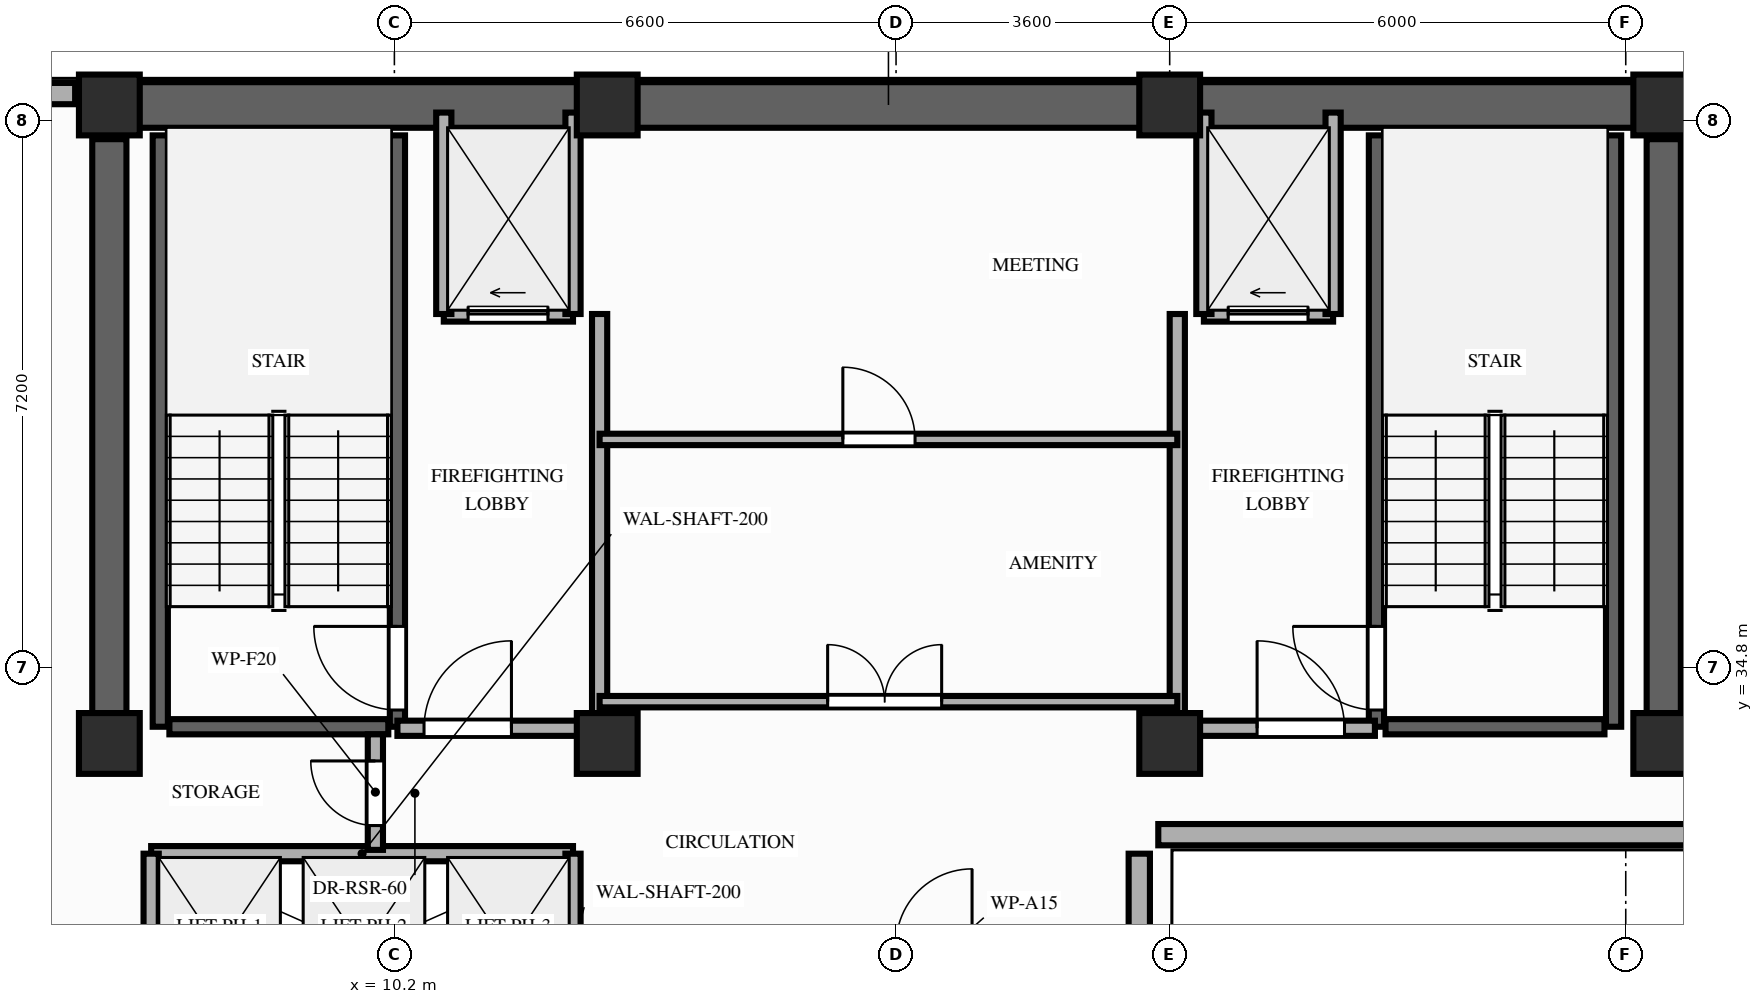
"""IFC4 building model, lengths in metres.
Left out: names, types, materials, properties, quantities, classifications, styles, units other than length and angle.
Written with IfcOpenShell. Run it as: python <this file> out.ifc"""

import sys

from ifc_helpers import new_model, si_unit, direction, frame, frame_2d, origin, origin_2d, place, context, subcontext, project, spatial, rectangle, extrude, element, fill, save


model = new_model("IFC4")
c1 = context("Model", 3, precision=1e-05, world=origin(), true_north=direction((0.0, 1.0)))
c2 = subcontext(c1, "Body", "Model", "MODEL_VIEW")
j1 = project(units=[si_unit("LENGTHUNIT", "METRE"), si_unit("PLANEANGLEUNIT", "RADIAN")], contexts=[c1])
p1 = place(None, origin())
s1 = spatial("IfcSite", under=j1, at=p1, CompositionType="ELEMENT")
p2 = place(p1, origin())
s2 = spatial("IfcBuilding", under=s1, at=p2, CompositionType="ELEMENT")
p3 = place(p2, frame((0.0, 0.0, 244.0)))
s3 = spatial("IfcBuildingStorey", under=s2, at=p3, CompositionType="ELEMENT", Elevation=244.0)
for number, where, z_axis, x_axis in (
    (1, (6.45, 33.8, 0.0), (0.0, 0.0, 1.0), (1.0, 0.0, 0.0)),
    (2, (13.0, 33.8, 0.0), (0.0, 0.0, 1.0), (1.0, 0.0, 0.0)),
    (3, (20.4, 33.8, 0.0), (0.0, 0.0, 1.0), (1.0, 0.0, 0.0)),
    (4, (26.9, 33.8, 0.0), (0.0, 0.0, 1.0), (1.0, 0.0, 0.0)),
    (5, (6.45, 42.2, 0.0), (0.0, 0.0, 1.0), (1.0, 0.0, 0.0)),
    (6, (13.0, 42.2, 0.0), (0.0, 0.0, 1.0), (1.0, 0.0, 0.0)),
    (7, (20.4, 42.2, 0.0), (0.0, 0.0, 1.0), (1.0, 0.0, 0.0)),
    (8, (26.9, 42.2, 0.0), (0.0, 0.0, 1.0), (1.0, 0.0, 0.0)),
):
    element("IfcColumn", number, at=place(p3, frame(where, z_axis=z_axis, x_axis=x_axis)), inside=s3, PredefinedType="COLUMN", context=c2, shape_type="SweptSolid", body=[
        extrude(rectangle(XDim=0.8, YDim=0.8, at=origin_2d()), origin(), (0.0, 0.0, 1.0), 3.2),
    ])
p4 = place(p3, frame((20.0, 10.8, 0.0), z_axis=(0.0, 0.0, 1.0), x_axis=(0.0, 1.0, 0.0)))
e9 = element("IfcWall", 9, at=p4, inside=s3, PredefinedType="STANDARD", context=c2, shape_type="SweptSolid", body=[
    extrude(rectangle(XDim=21.55, YDim=0.28, at=frame_2d((10.775, 0.0))), origin(), (0.0, 0.0, 1.0), 2.56),
])
p5 = place(p4, frame((8.6, 0.0, 0.85)))
e10 = element("IfcOpeningElement", 10, at=p5, cuts=e9, PredefinedType="OPENING", context=c2, shape_type="SweptSolid", body=[
    extrude(rectangle(XDim=2.6, YDim=1.46, at=frame_2d((1.3, 0.73))), frame((0.0, 0.15, 0.0), z_axis=(0.0, -1.0, 0.0), x_axis=(1.0, 0.0, 0.0)), (0.0, 0.0, 1.0), 0.3),
])
p6 = place(p3, frame((6.0, 42.35, 0.0), z_axis=(0.0, 0.0, 1.0), x_axis=(-1.0, 0.0, 0.0)))
e11 = element("IfcWall", 11, at=p6, inside=s3, PredefinedType="STANDARD", context=c2, shape_type="SweptSolid", body=[
    extrude(rectangle(XDim=1.0, YDim=0.28, at=frame_2d((0.5, 0.0))), origin(), (0.0, 0.0, 1.0), 3.02),
])
p7 = place(p3, frame((20.25, 32.6, 0.0), z_axis=(0.0, 0.0, 1.0), x_axis=(1.0, 0.0, 0.0)))
e12 = element("IfcWall", 12, at=p7, inside=s3, PredefinedType="STANDARD", context=c2, shape_type="SweptSolid", body=[
    extrude(rectangle(XDim=7.35, YDim=0.28, at=frame_2d((3.675, 0.0))), origin(), (0.0, 0.0, 1.0), 2.56),
])
p8 = place(p3, frame((6.45, 42.2, 0.0), z_axis=(0.0, 0.0, 1.0), x_axis=(1.0, 0.0, 0.0)))
e13 = element("IfcWall", 13, at=p8, inside=s3, PredefinedType="SHEAR", context=c2, shape_type="SweptSolid", body=[
    extrude(rectangle(XDim=20.45, YDim=0.6, at=frame_2d((10.225, 0.0))), origin(), (0.0, 0.0, 1.0), 3.02),
])
for number, where, z_axis, x_axis in (
    (14, (6.45, 33.8, 0.0), (0.0, 0.0, 1.0), (0.0, 1.0, 0.0)),
    (15, (26.9, 33.8, 0.0), (0.0, 0.0, 1.0), (0.0, 1.0, 0.0)),
):
    element("IfcWall", number, at=place(p3, frame(where, z_axis=z_axis, x_axis=x_axis)), inside=s3, PredefinedType="SHEAR", context=c2, shape_type="SweptSolid", body=[
        extrude(rectangle(XDim=7.95, YDim=0.45, at=frame_2d((3.975, 0.0))), origin(), (0.0, 0.0, 1.0), 3.02),
    ])
p9 = place(p3, frame((7.12, 34.02, 0.0), z_axis=(0.0, 0.0, 1.0), x_axis=(0.0, 1.0, 0.0)))
e16 = element("IfcWall", 16, at=p9, inside=s3, PredefinedType="SHEAR", context=c2, shape_type="SweptSolid", body=[
    extrude(rectangle(XDim=7.78, YDim=0.2, at=frame_2d((3.89, 0.0))), origin(), (0.0, 0.0, 1.0), 3.02),
])
p10 = place(p3, frame((10.24, 34.02, 0.0), z_axis=(0.0, 0.0, 1.0), x_axis=(0.0, 1.0, 0.0)))
e17 = element("IfcWall", 17, at=p10, inside=s3, PredefinedType="SHEAR", context=c2, shape_type="SweptSolid", body=[
    extrude(rectangle(XDim=7.78, YDim=0.2, at=frame_2d((3.89, 0.0))), origin(), (0.0, 0.0, 1.0), 3.02),
])
p11 = place(p10, frame((0.22, 0.0, 0.0)))
e18 = element("IfcOpeningElement", 18, at=p11, cuts=e17, PredefinedType="OPENING", context=c2, shape_type="SweptSolid", body=[
    extrude(rectangle(XDim=1.1, YDim=2.15, at=frame_2d((0.55, 1.075))), frame((0.0, 0.11, 0.0), z_axis=(0.0, -1.0, 0.0), x_axis=(1.0, 0.0, 0.0)), (0.0, 0.0, 1.0), 0.22),
])
p12 = place(p3, frame((7.24, 34.02, 0.0), z_axis=(0.0, 0.0, 1.0), x_axis=(1.0, 0.0, 0.0)))
e19 = element("IfcWall", 19, at=p12, inside=s3, PredefinedType="SHEAR", context=c2, shape_type="SweptSolid", body=[
    extrude(rectangle(XDim=2.88, YDim=0.2, at=frame_2d((1.44, 0.0))), origin(), (0.0, 0.0, 1.0), 3.02),
])
p13 = place(p3, frame((23.12, 34.02, 0.0), z_axis=(0.0, 0.0, 1.0), x_axis=(0.0, 1.0, 0.0)))
e20 = element("IfcWall", 20, at=p13, inside=s3, PredefinedType="SHEAR", context=c2, shape_type="SweptSolid", body=[
    extrude(rectangle(XDim=7.78, YDim=0.2, at=frame_2d((3.89, 0.0))), origin(), (0.0, 0.0, 1.0), 3.02),
])
p14 = place(p13, frame((0.22, 0.0, 0.0)))
e21 = element("IfcOpeningElement", 21, at=p14, cuts=e20, PredefinedType="OPENING", context=c2, shape_type="SweptSolid", body=[
    extrude(rectangle(XDim=1.1, YDim=2.15, at=frame_2d((0.55, 1.075))), frame((0.0, 0.11, 0.0), z_axis=(0.0, -1.0, 0.0), x_axis=(1.0, 0.0, 0.0)), (0.0, 0.0, 1.0), 0.22),
])
p15 = place(p3, frame((26.24, 34.02, 0.0), z_axis=(0.0, 0.0, 1.0), x_axis=(0.0, 1.0, 0.0)))
e22 = element("IfcWall", 22, at=p15, inside=s3, PredefinedType="SHEAR", context=c2, shape_type="SweptSolid", body=[
    extrude(rectangle(XDim=7.78, YDim=0.2, at=frame_2d((3.89, 0.0))), origin(), (0.0, 0.0, 1.0), 3.02),
])
p16 = place(p3, frame((23.24, 34.02, 0.0), z_axis=(0.0, 0.0, 1.0), x_axis=(1.0, 0.0, 0.0)))
e23 = element("IfcWall", 23, at=p16, inside=s3, PredefinedType="SHEAR", context=c2, shape_type="SweptSolid", body=[
    extrude(rectangle(XDim=2.88, YDim=0.2, at=frame_2d((1.44, 0.0))), origin(), (0.0, 0.0, 1.0), 3.02),
])
p17 = place(p3, frame((7.0, 32.35, 0.0), z_axis=(0.0, 0.0, 1.0), x_axis=(1.0, 0.0, 0.0)))
e24 = element("IfcWall", 24, at=p17, inside=s3, PredefinedType="MOVABLE", context=c2, shape_type="SweptSolid", body=[
    extrude(rectangle(XDim=5.55, YDim=0.2, at=frame_2d((2.775, 0.0))), origin(), (0.0, 0.0, 1.0), 3.02),
])
for number, where, z_axis, x_axis in (
    (25, (7.0, 29.85, 0.0), (0.0, 0.0, 1.0), (0.0, 1.0, 0.0)),
    (26, (12.55, 29.85, 0.0), (0.0, 0.0, 1.0), (0.0, 1.0, 0.0)),
):
    element("IfcWall", number, at=place(p3, frame(where, z_axis=z_axis, x_axis=x_axis)), inside=s3, PredefinedType="MOVABLE", context=c2, shape_type="SweptSolid", body=[
        extrude(rectangle(XDim=2.5, YDim=0.2, at=frame_2d((1.25, 0.0))), origin(), (0.0, 0.0, 1.0), 3.02),
    ])
p18 = place(p3, frame((10.85, 39.45, 0.0), z_axis=(0.0, 0.0, 1.0), x_axis=(1.0, 0.0, 0.0)))
e27 = element("IfcWall", 27, at=p18, inside=s3, PredefinedType="MOVABLE", context=c2, shape_type="SweptSolid", body=[
    extrude(rectangle(XDim=1.7, YDim=0.2, at=frame_2d((0.85, 0.0))), origin(), (0.0, 0.0, 1.0), 3.02),
])
p19 = place(p18, frame((0.32, 0.0, 0.0)))
e28 = element("IfcOpeningElement", 28, at=p19, cuts=e27, PredefinedType="OPENING", context=c2, shape_type="SweptSolid", body=[
    extrude(rectangle(XDim=1.05, YDim=2.15, at=frame_2d((0.525, 1.075))), frame((0.0, 0.11, 0.0), z_axis=(0.0, -1.0, 0.0), x_axis=(1.0, 0.0, 0.0)), (0.0, 0.0, 1.0), 0.22),
])
p20 = place(p3, frame((20.85, 39.45, 0.0), z_axis=(0.0, 0.0, 1.0), x_axis=(1.0, 0.0, 0.0)))
e29 = element("IfcWall", 29, at=p20, inside=s3, PredefinedType="MOVABLE", context=c2, shape_type="SweptSolid", body=[
    extrude(rectangle(XDim=1.7, YDim=0.2, at=frame_2d((0.85, 0.0))), origin(), (0.0, 0.0, 1.0), 3.02),
])
p21 = place(p20, frame((0.32, 0.0, 0.0)))
e30 = element("IfcOpeningElement", 30, at=p21, cuts=e29, PredefinedType="OPENING", context=c2, shape_type="SweptSolid", body=[
    extrude(rectangle(XDim=1.05, YDim=2.15, at=frame_2d((0.525, 1.075))), frame((0.0, 0.11, 0.0), z_axis=(0.0, -1.0, 0.0), x_axis=(1.0, 0.0, 0.0)), (0.0, 0.0, 1.0), 0.22),
])
for number, where, z_axis, x_axis in (
    (31, (10.85, 39.45, 0.0), (0.0, 0.0, 1.0), (0.0, 1.0, 0.0)),
    (32, (12.55, 39.45, 0.0), (0.0, 0.0, 1.0), (0.0, 1.0, 0.0)),
):
    element("IfcWall", number, at=place(p3, frame(where, z_axis=z_axis, x_axis=x_axis)), inside=s3, PredefinedType="MOVABLE", context=c2, shape_type="SweptSolid", body=[
        extrude(rectangle(XDim=2.65, YDim=0.2, at=frame_2d((1.325, 0.0))), origin(), (0.0, 0.0, 1.0), 2.56),
    ])
p22 = place(p3, frame((12.9, 34.0, 0.0), z_axis=(0.0, 0.0, 1.0), x_axis=(0.0, 1.0, 0.0)))
e33 = element("IfcWall", 33, at=p22, inside=s3, PredefinedType="PARTITIONING", context=c2, shape_type="SweptSolid", body=[
    extrude(rectangle(XDim=5.45, YDim=0.2, at=frame_2d((2.725, 0.0))), origin(), (0.0, 0.0, 1.0), 2.56),
])
p23 = place(p3, frame((10.24, 34.0, 0.0), z_axis=(0.0, 0.0, 1.0), x_axis=(1.0, 0.0, 0.0)))
e34 = element("IfcWall", 34, at=p23, inside=s3, PredefinedType="PARTITIONING", context=c2, shape_type="SweptSolid", body=[
    extrude(rectangle(XDim=2.66, YDim=0.2, at=frame_2d((1.33, 0.0))), origin(), (0.0, 0.0, 1.0), 2.56),
])
p24 = place(p23, frame((0.35, 0.0, 0.0)))
e35 = element("IfcOpeningElement", 35, at=p24, cuts=e34, PredefinedType="OPENING", context=c2, shape_type="SweptSolid", body=[
    extrude(rectangle(XDim=1.15, YDim=2.15, at=frame_2d((0.575, 1.075))), frame((0.0, 0.11, 0.0), z_axis=(0.0, -1.0, 0.0), x_axis=(1.0, 0.0, 0.0)), (0.0, 0.0, 1.0), 0.22),
])
for number, where, z_axis, x_axis in (
    (36, (20.85, 39.45, 0.0), (0.0, 0.0, 1.0), (0.0, 1.0, 0.0)),
    (37, (22.55, 39.45, 0.0), (0.0, 0.0, 1.0), (0.0, 1.0, 0.0)),
):
    element("IfcWall", number, at=place(p3, frame(where, z_axis=z_axis, x_axis=x_axis)), inside=s3, PredefinedType="MOVABLE", context=c2, shape_type="SweptSolid", body=[
        extrude(rectangle(XDim=2.65, YDim=0.2, at=frame_2d((1.325, 0.0))), origin(), (0.0, 0.0, 1.0), 2.56),
    ])
p25 = place(p3, frame((20.5, 34.0, 0.0), z_axis=(0.0, 0.0, 1.0), x_axis=(0.0, 1.0, 0.0)))
e38 = element("IfcWall", 38, at=p25, inside=s3, PredefinedType="PARTITIONING", context=c2, shape_type="SweptSolid", body=[
    extrude(rectangle(XDim=5.45, YDim=0.2, at=frame_2d((2.725, 0.0))), origin(), (0.0, 0.0, 1.0), 2.56),
])
p26 = place(p3, frame((20.5, 34.0, 0.0), z_axis=(0.0, 0.0, 1.0), x_axis=(1.0, 0.0, 0.0)))
e39 = element("IfcWall", 39, at=p26, inside=s3, PredefinedType="PARTITIONING", context=c2, shape_type="SweptSolid", body=[
    extrude(rectangle(XDim=2.6, YDim=0.2, at=frame_2d((1.3, 0.0))), origin(), (0.0, 0.0, 1.0), 2.56),
])
p27 = place(p26, frame((1.05, 0.0, 0.0)))
e40 = element("IfcOpeningElement", 40, at=p27, cuts=e39, PredefinedType="OPENING", context=c2, shape_type="SweptSolid", body=[
    extrude(rectangle(XDim=1.15, YDim=2.15, at=frame_2d((0.575, 1.075))), frame((0.0, 0.11, 0.0), z_axis=(0.0, -1.0, 0.0), x_axis=(1.0, 0.0, 0.0)), (0.0, 0.0, 1.0), 0.22),
])
p28 = place(p3, frame((9.95, 32.4, 0.0), z_axis=(0.0, 0.0, 1.0), x_axis=(0.0, 1.0, 0.0)))
e41 = element("IfcWall", 41, at=p28, inside=s3, PredefinedType="PARTITIONING", context=c2, shape_type="SweptSolid", body=[
    extrude(rectangle(XDim=1.52, YDim=0.2, at=frame_2d((0.76, 0.0))), origin(), (0.0, 0.0, 1.0), 2.56),
])
p29 = place(p28, frame((0.32, 0.0, 0.0)))
e42 = element("IfcOpeningElement", 42, at=p29, cuts=e41, PredefinedType="OPENING", context=c2, shape_type="SweptSolid", body=[
    extrude(rectangle(XDim=0.85, YDim=2.05, at=frame_2d((0.425, 1.025))), frame((0.0, 0.11, 0.0), z_axis=(0.0, -1.0, 0.0), x_axis=(1.0, 0.0, 0.0)), (0.0, 0.0, 1.0), 0.22),
])
p30 = place(p3, frame((12.9, 34.35, 0.0), z_axis=(0.0, 0.0, 1.0), x_axis=(1.0, 0.0, 0.0)))
e43 = element("IfcWall", 43, at=p30, inside=s3, PredefinedType="PARTITIONING", context=c2, shape_type="SweptSolid", body=[
    extrude(rectangle(XDim=7.6, YDim=0.15, at=frame_2d((3.8, 0.0))), origin(), (0.0, 0.0, 1.0), 3.02),
])
p31 = place(p30, frame((3.0, 0.0, 0.0)))
e44 = element("IfcOpeningElement", 44, at=p31, cuts=e43, PredefinedType="OPENING", context=c2, shape_type="SweptSolid", body=[
    extrude(rectangle(XDim=1.5, YDim=2.15, at=frame_2d((0.75, 1.075))), frame((0.0, 0.085, 0.0), z_axis=(0.0, -1.0, 0.0), x_axis=(1.0, 0.0, 0.0)), (0.0, 0.0, 1.0), 0.17),
])
p32 = place(p3, frame((12.9, 37.8, 0.0), z_axis=(0.0, 0.0, 1.0), x_axis=(1.0, 0.0, 0.0)))
e45 = element("IfcWall", 45, at=p32, inside=s3, PredefinedType="PARTITIONING", context=c2, shape_type="SweptSolid", body=[
    extrude(rectangle(XDim=7.6, YDim=0.15, at=frame_2d((3.8, 0.0))), origin(), (0.0, 0.0, 1.0), 3.02),
])
p33 = place(p32, frame((3.2, 0.0, 0.0)))
e46 = element("IfcOpeningElement", 46, at=p33, cuts=e45, PredefinedType="OPENING", context=c2, shape_type="SweptSolid", body=[
    extrude(rectangle(XDim=0.95, YDim=2.15, at=frame_2d((0.475, 1.075))), frame((0.0, 0.085, 0.0), z_axis=(0.0, -1.0, 0.0), x_axis=(1.0, 0.0, 0.0)), (0.0, 0.0, 1.0), 0.17),
])
p34 = place(p11, origin())
e47 = element("IfcDoor", 47, at=p34, inside=s3, OperationType="SINGLE_SWING_RIGHT", PredefinedType="DOOR", context=c2, shape_type="SweptSolid", body=[
    extrude(rectangle(XDim=1.1, YDim=2.15, at=frame_2d((0.55, 1.075))), frame((0.0, 0.025, 0.0), z_axis=(0.0, -1.0, 0.0), x_axis=(1.0, 0.0, 0.0)), (0.0, 0.0, 1.0), 0.05),
])
fill(e18, e47)
p35 = place(p14, origin())
e48 = element("IfcDoor", 48, at=p35, inside=s3, OperationType="SINGLE_SWING_RIGHT", PredefinedType="DOOR", context=c2, shape_type="SweptSolid", body=[
    extrude(rectangle(XDim=1.1, YDim=2.15, at=frame_2d((0.55, 1.075))), frame((0.0, 0.025, 0.0), z_axis=(0.0, -1.0, 0.0), x_axis=(1.0, 0.0, 0.0)), (0.0, 0.0, 1.0), 0.05),
])
fill(e21, e48)
p36 = place(p19, origin())
e49 = element("IfcDoor", 49, at=p36, inside=s3, OperationType="SLIDING_TO_LEFT", PredefinedType="DOOR", context=c2, shape_type="SweptSolid", body=[
    extrude(rectangle(XDim=1.05, YDim=2.15, at=frame_2d((0.525, 1.075))), frame((0.0, 0.025, 0.0), z_axis=(0.0, -1.0, 0.0), x_axis=(1.0, 0.0, 0.0)), (0.0, 0.0, 1.0), 0.05),
])
fill(e28, e49)
p37 = place(p21, origin())
e50 = element("IfcDoor", 50, at=p37, inside=s3, OperationType="SLIDING_TO_LEFT", PredefinedType="DOOR", context=c2, shape_type="SweptSolid", body=[
    extrude(rectangle(XDim=1.05, YDim=2.15, at=frame_2d((0.525, 1.075))), frame((0.0, 0.025, 0.0), z_axis=(0.0, -1.0, 0.0), x_axis=(1.0, 0.0, 0.0)), (0.0, 0.0, 1.0), 0.05),
])
fill(e30, e50)
p38 = place(p24, origin())
e51 = element("IfcDoor", 51, at=p38, inside=s3, OperationType="SINGLE_SWING_RIGHT", PredefinedType="DOOR", context=c2, shape_type="SweptSolid", body=[
    extrude(rectangle(XDim=1.15, YDim=2.15, at=frame_2d((0.575, 1.075))), frame((0.0, 0.025, 0.0), z_axis=(0.0, -1.0, 0.0), x_axis=(1.0, 0.0, 0.0)), (0.0, 0.0, 1.0), 0.05),
])
fill(e35, e51)
p39 = place(p27, origin())
e52 = element("IfcDoor", 52, at=p39, inside=s3, OperationType="SINGLE_SWING_LEFT", PredefinedType="DOOR", context=c2, shape_type="SweptSolid", body=[
    extrude(rectangle(XDim=1.15, YDim=2.15, at=frame_2d((0.575, 1.075))), frame((0.0, 0.025, 0.0), z_axis=(0.0, -1.0, 0.0), x_axis=(1.0, 0.0, 0.0)), (0.0, 0.0, 1.0), 0.05),
])
fill(e40, e52)
p40 = place(p29, origin())
e53 = element("IfcDoor", 53, at=p40, inside=s3, OperationType="SINGLE_SWING_RIGHT", PredefinedType="DOOR", context=c2, shape_type="SweptSolid", body=[
    extrude(rectangle(XDim=0.85, YDim=2.05, at=frame_2d((0.425, 1.025))), frame((0.0, 0.025, 0.0), z_axis=(0.0, -1.0, 0.0), x_axis=(1.0, 0.0, 0.0)), (0.0, 0.0, 1.0), 0.05),
])
fill(e42, e53)
p41 = place(p31, origin())
e54 = element("IfcDoor", 54, at=p41, inside=s3, OperationType="DOUBLE_DOOR_SINGLE_SWING", PredefinedType="DOOR", context=c2, shape_type="SweptSolid", body=[
    extrude(rectangle(XDim=1.5, YDim=2.15, at=frame_2d((0.75, 1.075))), frame((0.0, 0.025, 0.0), z_axis=(0.0, -1.0, 0.0), x_axis=(1.0, 0.0, 0.0)), (0.0, 0.0, 1.0), 0.05),
])
fill(e44, e54)
p42 = place(p33, origin())
e55 = element("IfcDoor", 55, at=p42, inside=s3, OperationType="SINGLE_SWING_LEFT", PredefinedType="DOOR", context=c2, shape_type="SweptSolid", body=[
    extrude(rectangle(XDim=0.95, YDim=2.15, at=frame_2d((0.475, 1.075))), frame((0.0, 0.025, 0.0), z_axis=(0.0, -1.0, 0.0), x_axis=(1.0, 0.0, 0.0)), (0.0, 0.0, 1.0), 0.05),
])
fill(e46, e55)
save(model, sys.argv[1])
